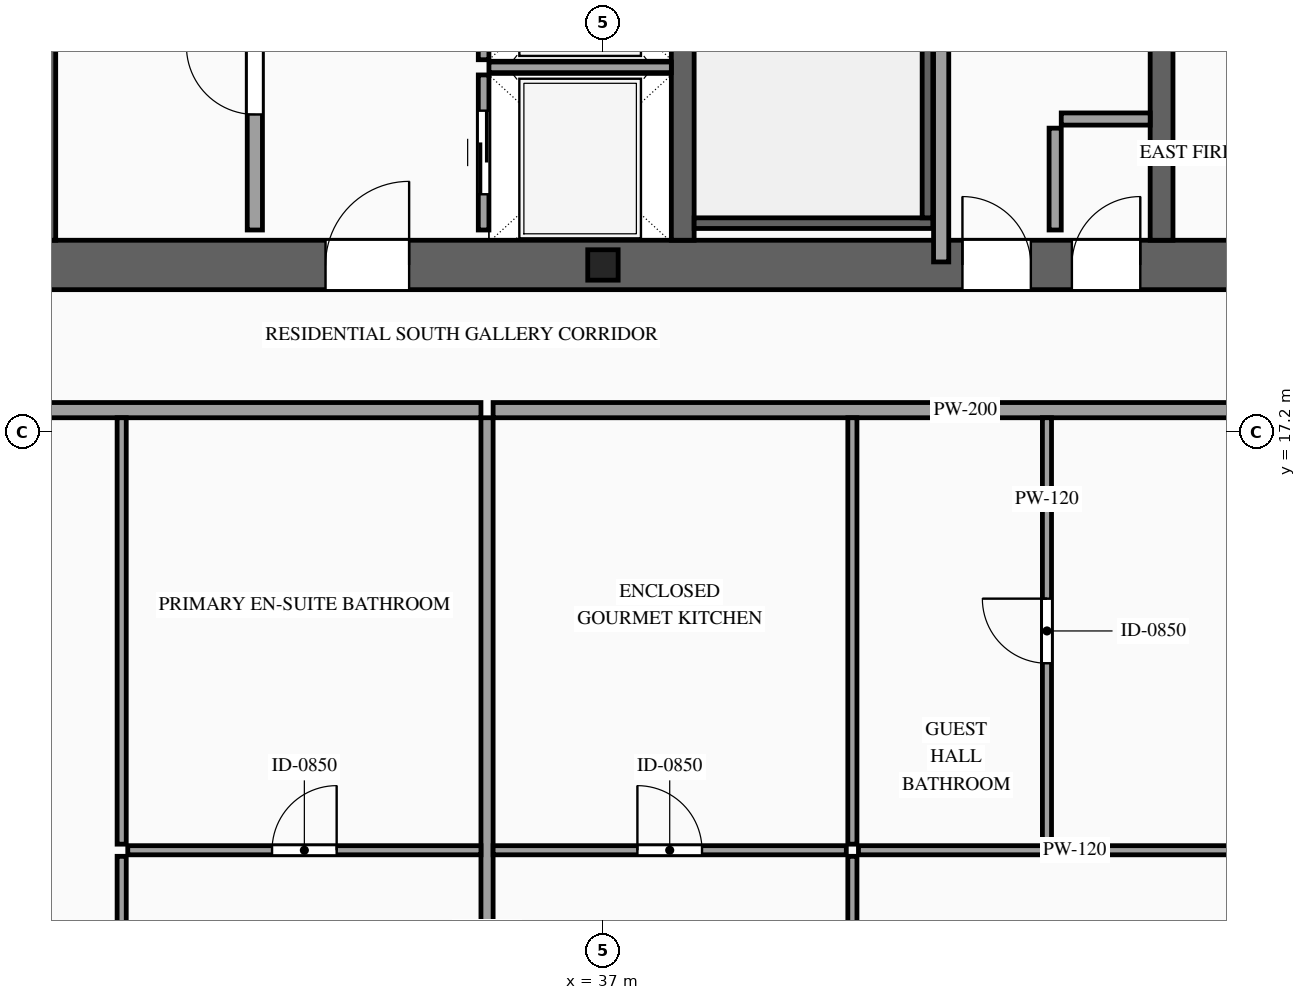
"""IFC4 building model, lengths in metres.
Left out: names, types, materials, properties, quantities, classifications, styles, units other than length and angle.
Written with IfcOpenShell. Run it as: python <this file> out.ifc"""

import sys

from ifc_helpers import new_model, si_unit, direction, frame, frame_2d, origin, origin_2d, place, context, subcontext, project, spatial, rectangle, i_section, extrude, source, transform, mapped, element, fill, save


model = new_model("IFC4")
c1 = context("Model", 3, precision=1e-05, world=origin(), true_north=direction((0.0, 1.0)))
c2 = subcontext(c1, "Body", "Model", "MODEL_VIEW")
j1 = project(units=[si_unit("LENGTHUNIT", "METRE"), si_unit("PLANEANGLEUNIT", "RADIAN")], contexts=[c1])
p1 = place(None, origin())
s1 = spatial("IfcSite", under=j1, at=p1, CompositionType="ELEMENT")
p2 = place(p1, origin())
s2 = spatial("IfcBuilding", under=s1, at=p2, CompositionType="ELEMENT")
p3 = place(p2, frame((0.0, 0.0, 216.0)))
s3 = spatial("IfcBuildingStorey", under=s2, at=p3, CompositionType="ELEMENT", Elevation=216.0)
p4 = place(p3, frame((23.475, 19.4, 0.0), z_axis=(0.0, 0.0, 1.0), x_axis=(1.0, 0.0, 0.0)))
e1 = element("IfcWall", 1, at=p4, inside=s3, PredefinedType="SHEAR", context=c2, shape_type="SweptSolid", body=[
    extrude(rectangle(XDim=27.05, YDim=0.65, at=frame_2d((13.525, 0.0))), origin(), (0.0, 0.0, 1.0), 3.5),
])
p5 = place(p4, frame((1.975, 0.0, 0.0)))
e2 = element("IfcOpeningElement", 2, at=p5, cuts=e1, PredefinedType="OPENING", context=c2, shape_type="SweptSolid", body=[
    extrude(rectangle(XDim=1.1, YDim=2.2, at=frame_2d((0.55, 1.1))), frame((0.0, 0.34, 0.0), z_axis=(0.0, -1.0, 0.0), x_axis=(1.0, 0.0, 0.0)), (0.0, 0.0, 1.0), 0.68),
])
p6 = place(p4, frame((9.875, 0.0, 0.0)))
e3 = element("IfcOpeningElement", 3, at=p6, cuts=e1, PredefinedType="OPENING", context=c2, shape_type="SweptSolid", body=[
    extrude(rectangle(XDim=1.1, YDim=2.2, at=frame_2d((0.55, 1.1))), frame((0.0, 0.34, 0.0), z_axis=(0.0, -1.0, 0.0), x_axis=(1.0, 0.0, 0.0)), (0.0, 0.0, 1.0), 0.68),
])
p7 = place(p4, frame((23.075, 0.0, 0.0)))
e4 = element("IfcOpeningElement", 4, at=p7, cuts=e1, PredefinedType="OPENING", context=c2, shape_type="SweptSolid", body=[
    extrude(rectangle(XDim=1.1, YDim=2.2, at=frame_2d((0.55, 1.1))), frame((0.0, 0.34, 0.0), z_axis=(0.0, -1.0, 0.0), x_axis=(1.0, 0.0, 0.0)), (0.0, 0.0, 1.0), 0.68),
])
p8 = place(p4, frame((19.695, 0.0, 0.0)))
e5 = element("IfcOpeningElement", 5, at=p8, cuts=e1, PredefinedType="OPENING", context=c2, shape_type="SweptSolid", body=[
    extrude(rectangle(XDim=0.9, YDim=2.15, at=frame_2d((0.45, 1.075))), frame((0.0, 0.34, 0.0), z_axis=(0.0, -1.0, 0.0), x_axis=(1.0, 0.0, 0.0)), (0.0, 0.0, 1.0), 0.68),
])
p9 = place(p4, frame((18.255, 0.0, 0.0)))
e6 = element("IfcOpeningElement", 6, at=p9, cuts=e1, PredefinedType="OPENING", context=c2, shape_type="SweptSolid", body=[
    extrude(rectangle(XDim=0.9, YDim=2.15, at=frame_2d((0.45, 1.075))), frame((0.0, 0.34, 0.0), z_axis=(0.0, -1.0, 0.0), x_axis=(1.0, 0.0, 0.0)), (0.0, 0.0, 1.0), 0.68),
])
m1 = source(origin(), c2, "Body", "SweptSolid", [
    extrude(rectangle(XDim=12.15, YDim=0.3, at=frame_2d((6.075, 0.0))), origin(), (0.0, 0.0, 1.0), 3.5),
])
for number, where, z_axis, x_axis in (
    (7, (29.65, 19.725, 0.0), (0.0, 0.0, 1.0), (0.0, 1.0, 0.0)),
    (8, (38.05, 19.725, 0.0), (0.0, 0.0, 1.0), (0.0, 1.0, 0.0)),
    (9, (44.35, 19.725, 0.0), (0.0, 0.0, 1.0), (0.0, 1.0, 0.0)),
):
    element("IfcWall", number, at=place(p3, frame(where, z_axis=z_axis, x_axis=x_axis)), inside=s3, PredefinedType="SOLIDWALL", context=c2, shape_type="MappedRepresentation", body=[
        mapped(m1, transform((0.0, 0.0, 0.0), scale=1.0)),
    ])
m2 = source(origin(), c2, "Body", "SweptSolid", [
    extrude(i_section(OverallWidth=0.4, OverallDepth=0.4, WebThickness=0.013, FlangeThickness=0.021, at=origin_2d()), origin(), (0.0, 0.0, 1.0), 3.5),
])
p10 = place(p3, frame((37.0, 19.4, 0.0), z_axis=(0.0, 0.0, 1.0), x_axis=(1.0, 0.0, 0.0)))
e10 = element("IfcColumn", 10, at=p10, inside=s3, PredefinedType="COLUMN", context=c2, shape_type="MappedRepresentation", body=[
    mapped(m2, transform((0.0, 0.0, 0.0), scale=1.0)),
])
p11 = place(p3, frame((35.43, 19.86, 0.0), z_axis=(0.0, 0.0, 1.0), x_axis=(0.0, 1.0, 0.0)))
e11 = element("IfcWall", 11, at=p11, inside=s3, PredefinedType="SOLIDWALL", context=c2, shape_type="SweptSolid", body=[
    extrude(rectangle(XDim=2.04, YDim=0.14, at=frame_2d((1.02, 0.0))), origin(), (0.0, 0.0, 1.0), 3.22),
])
p12 = place(p11, frame((0.47, 0.0, 0.0)))
e12 = element("IfcOpeningElement", 12, at=p12, cuts=e11, PredefinedType="OPENING", context=c2, shape_type="SweptSolid", body=[
    extrude(rectangle(XDim=1.1, YDim=2.2, at=frame_2d((0.55, 1.1))), frame((0.0, 0.085, 0.0), z_axis=(0.0, -1.0, 0.0), x_axis=(1.0, 0.0, 0.0)), (0.0, 0.0, 1.0), 0.17),
])
m3 = source(origin(), c2, "Body", "SweptSolid", [
    extrude(rectangle(XDim=2.4, YDim=0.14, at=frame_2d((1.2, 0.0))), origin(), (0.0, 0.0, 1.0), 3.22),
])
p13 = place(p3, frame((35.5, 22.0, 0.0), z_axis=(0.0, 0.0, 1.0), x_axis=(1.0, 0.0, 0.0)))
e13 = element("IfcWall", 13, at=p13, inside=s3, PredefinedType="SOLIDWALL", context=c2, shape_type="MappedRepresentation", body=[
    mapped(m3, transform((0.0, 0.0, 0.0), scale=1.0)),
])
p14 = place(p3, frame((35.43, 22.1, 0.0), z_axis=(0.0, 0.0, 1.0), x_axis=(0.0, 1.0, 0.0)))
e14 = element("IfcWall", 14, at=p14, inside=s3, PredefinedType="SOLIDWALL", context=c2, shape_type="SweptSolid", body=[
    extrude(rectangle(XDim=2.2, YDim=0.14, at=frame_2d((1.1, 0.0))), origin(), (0.0, 0.0, 1.0), 3.22),
])
p15 = place(p14, frame((0.55, 0.0, 0.0)))
e15 = element("IfcOpeningElement", 15, at=p15, cuts=e14, PredefinedType="OPENING", context=c2, shape_type="SweptSolid", body=[
    extrude(rectangle(XDim=1.1, YDim=2.2, at=frame_2d((0.55, 1.1))), frame((0.0, 0.085, 0.0), z_axis=(0.0, -1.0, 0.0), x_axis=(1.0, 0.0, 0.0)), (0.0, 0.0, 1.0), 0.17),
])
m4 = source(origin(), c2, "Body", "SweptSolid", [
    extrude(rectangle(XDim=3.14, YDim=0.14, at=frame_2d((1.57, 0.0))), origin(), (0.0, 0.0, 1.0), 3.22),
])
p16 = place(p3, frame((38.2, 19.95, 0.0), z_axis=(0.0, 0.0, 1.0), x_axis=(1.0, 0.0, 0.0)))
e16 = element("IfcWall", 16, at=p16, inside=s3, PredefinedType="SOLIDWALL", context=c2, shape_type="MappedRepresentation", body=[
    mapped(m4, transform((0.0, 0.0, 0.0), scale=1.0)),
])
m5 = source(origin(), c2, "Body", "SweptSolid", [
    extrude(rectangle(XDim=8.94, YDim=0.14, at=frame_2d((4.47, 0.0))), origin(), (0.0, 0.0, 1.0), 3.22),
])
p17 = place(p3, frame((41.27, 20.02, 0.0), z_axis=(0.0, 0.0, 1.0), x_axis=(0.0, 1.0, 0.0)))
e17 = element("IfcWall", 17, at=p17, inside=s3, PredefinedType="SOLIDWALL", context=c2, shape_type="MappedRepresentation", body=[
    mapped(m5, transform((0.0, 0.0, 0.0), scale=1.0)),
])
p18 = place(p3, frame((32.42, 19.86, 0.0), z_axis=(0.0, 0.0, 1.0), x_axis=(0.0, 1.0, 0.0)))
e18 = element("IfcWall", 18, at=p18, inside=s3, PredefinedType="PARTITIONING", context=c2, shape_type="SweptSolid", body=[
    extrude(rectangle(XDim=3.94, YDim=0.2, at=frame_2d((1.97, 0.0))), origin(), (0.0, 0.0, 1.0), 3.22),
])
p19 = place(p18, frame((1.52, 0.0, 0.0)))
e19 = element("IfcOpeningElement", 19, at=p19, cuts=e18, PredefinedType="OPENING", context=c2, shape_type="SweptSolid", body=[
    extrude(rectangle(XDim=0.9, YDim=2.15, at=frame_2d((0.45, 1.075))), frame((0.0, 0.115, 0.0), z_axis=(0.0, -1.0, 0.0), x_axis=(1.0, 0.0, 0.0)), (0.0, 0.0, 1.0), 0.23),
])
m6 = source(origin(), c2, "Body", "SweptSolid", [
    extrude(rectangle(XDim=1.34, YDim=0.16, at=frame_2d((0.67, 0.0))), origin(), (0.0, 0.0, 1.0), 3.22),
])
p20 = place(p3, frame((42.95, 19.86, 0.0), z_axis=(0.0, 0.0, 1.0), x_axis=(0.0, 1.0, 0.0)))
e20 = element("IfcWall", 20, at=p20, inside=s3, PredefinedType="PARTITIONING", context=c2, shape_type="MappedRepresentation", body=[
    mapped(m6, transform((0.0, 0.0, 0.0), scale=1.0)),
])
m7 = source(origin(), c2, "Body", "SweptSolid", [
    extrude(rectangle(XDim=1.17, YDim=0.16, at=frame_2d((0.585, 0.0))), origin(), (0.0, 0.0, 1.0), 3.22),
])
p21 = place(p3, frame((43.03, 21.32, 0.0), z_axis=(0.0, 0.0, 1.0), x_axis=(1.0, 0.0, 0.0)))
e21 = element("IfcWall", 21, at=p21, inside=s3, PredefinedType="PARTITIONING", context=c2, shape_type="MappedRepresentation", body=[
    mapped(m7, transform((0.0, 0.0, 0.0), scale=1.0)),
])
m8 = source(origin(), c2, "Body", "SweptSolid", [
    extrude(rectangle(XDim=6.51, YDim=0.2, at=frame_2d((3.255, 0.0))), origin(), (0.0, 0.0, 1.0), 3.22),
])
p22 = place(p3, frame((41.45, 19.44, 0.0), z_axis=(0.0, 0.0, 1.0), x_axis=(0.0, 1.0, 0.0)))
e22 = element("IfcWall", 22, at=p22, inside=s3, PredefinedType="PARTITIONING", context=c2, shape_type="MappedRepresentation", body=[
    mapped(m8, transform((0.0, 0.0, 0.0), scale=1.0)),
])
p23 = place(p3, frame((17.94, 17.49, 0.0), z_axis=(0.0, 0.0, 1.0), x_axis=(1.0, 0.0, 0.0)))
e23 = element("IfcWall", 23, at=p23, inside=s3, PredefinedType="PARTITIONING", context=c2, shape_type="SweptSolid", body=[
    extrude(rectangle(XDim=17.455, YDim=0.2, at=frame_2d((8.728, 0.0))), origin(), (0.0, 0.0, 1.0), 3.22),
])
p24 = place(p23, frame((10.033, 0.0, 0.0)))
e24 = element("IfcOpeningElement", 24, at=p24, cuts=e23, PredefinedType="OPENING", context=c2, shape_type="SweptSolid", body=[
    extrude(rectangle(XDim=1.0, YDim=2.2, at=frame_2d((0.5, 1.1))), frame((0.0, 0.115, 0.0), z_axis=(0.0, -1.0, 0.0), x_axis=(1.0, 0.0, 0.0)), (0.0, 0.0, 1.0), 0.23),
])
m9 = source(origin(), c2, "Body", "SweptSolid", [
    extrude(rectangle(XDim=13.54, YDim=0.16, at=frame_2d((6.77, 0.0))), origin(), (0.0, 0.0, 1.0), 3.22),
])
p25 = place(p3, frame((35.475, 3.85, 0.0), z_axis=(0.0, 0.0, 1.0), x_axis=(0.0, 1.0, 0.0)))
e25 = element("IfcWall", 25, at=p25, inside=s3, PredefinedType="PARTITIONING", context=c2, shape_type="MappedRepresentation", body=[
    mapped(m9, transform((0.0, 0.0, 0.0), scale=1.0)),
])
p26 = place(p3, frame((30.748, 11.7, 0.0), z_axis=(0.0, 0.0, 1.0), x_axis=(1.0, 0.0, 0.0)))
e26 = element("IfcWall", 26, at=p26, inside=s3, PredefinedType="PARTITIONING", context=c2, shape_type="SweptSolid", body=[
    extrude(rectangle(XDim=4.647, YDim=0.12, at=frame_2d((2.323, 0.0))), origin(), (0.0, 0.0, 1.0), 3.22),
])
p27 = place(p26, frame((1.898, 0.0, 0.0)))
e27 = element("IfcOpeningElement", 27, at=p27, cuts=e26, PredefinedType="OPENING", context=c2, shape_type="SweptSolid", body=[
    extrude(rectangle(XDim=0.85, YDim=2.1, at=frame_2d((0.425, 1.05))), frame((0.0, 0.075, 0.0), z_axis=(0.0, -1.0, 0.0), x_axis=(1.0, 0.0, 0.0)), (0.0, 0.0, 1.0), 0.15),
])
m10 = source(origin(), c2, "Body", "SweptSolid", [
    extrude(rectangle(XDim=5.61, YDim=0.12, at=frame_2d((2.805, 0.0))), origin(), (0.0, 0.0, 1.0), 3.22),
])
p28 = place(p3, frame((30.668, 11.78, 0.0), z_axis=(0.0, 0.0, 1.0), x_axis=(0.0, 1.0, 0.0)))
e28 = element("IfcWall", 28, at=p28, inside=s3, PredefinedType="PARTITIONING", context=c2, shape_type="MappedRepresentation", body=[
    mapped(m10, transform((0.0, 0.0, 0.0), scale=1.0)),
])
p29 = place(p3, frame((30.668, 3.85, 0.0), z_axis=(0.0, 0.0, 1.0), x_axis=(0.0, 1.0, 0.0)))
e29 = element("IfcWall", 29, at=p29, inside=s3, PredefinedType="PARTITIONING", context=c2, shape_type="SweptSolid", body=[
    extrude(rectangle(XDim=7.77, YDim=0.12, at=frame_2d((3.885, 0.0))), origin(), (0.0, 0.0, 1.0), 3.22),
])
p30 = place(p29, frame((3.435, 0.0, 0.0)))
e30 = element("IfcOpeningElement", 30, at=p30, cuts=e29, PredefinedType="OPENING", context=c2, shape_type="SweptSolid", body=[
    extrude(rectangle(XDim=0.9, YDim=2.15, at=frame_2d((0.45, 1.075))), frame((0.0, 0.075, 0.0), z_axis=(0.0, -1.0, 0.0), x_axis=(1.0, 0.0, 0.0)), (0.0, 0.0, 1.0), 0.15),
])
p31 = place(p3, frame((35.555, 17.49, 0.0), z_axis=(0.0, 0.0, 1.0), x_axis=(1.0, 0.0, 0.0)))
e31 = element("IfcWall", 31, at=p31, inside=s3, PredefinedType="PARTITIONING", context=c2, shape_type="SweptSolid", body=[
    extrude(rectangle(XDim=20.505, YDim=0.2, at=frame_2d((10.252, 0.0))), origin(), (0.0, 0.0, 1.0), 3.22),
])
p32 = place(p31, frame((12.678, 0.0, 0.0)))
e32 = element("IfcOpeningElement", 32, at=p32, cuts=e31, PredefinedType="OPENING", context=c2, shape_type="SweptSolid", body=[
    extrude(rectangle(XDim=1.0, YDim=2.2, at=frame_2d((0.5, 1.1))), frame((0.0, 0.115, 0.0), z_axis=(0.0, -1.0, 0.0), x_axis=(1.0, 0.0, 0.0)), (0.0, 0.0, 1.0), 0.23),
])
p33 = place(p3, frame((35.555, 11.7, 0.0), z_axis=(0.0, 0.0, 1.0), x_axis=(1.0, 0.0, 0.0)))
e33 = element("IfcWall", 33, at=p33, inside=s3, PredefinedType="PARTITIONING", context=c2, shape_type="SweptSolid", body=[
    extrude(rectangle(XDim=4.647, YDim=0.12, at=frame_2d((2.323, 0.0))), origin(), (0.0, 0.0, 1.0), 3.22),
])
p34 = place(p33, frame((1.898, 0.0, 0.0)))
e34 = element("IfcOpeningElement", 34, at=p34, cuts=e33, PredefinedType="OPENING", context=c2, shape_type="SweptSolid", body=[
    extrude(rectangle(XDim=0.85, YDim=2.1, at=frame_2d((0.425, 1.05))), frame((0.0, 0.075, 0.0), z_axis=(0.0, -1.0, 0.0), x_axis=(1.0, 0.0, 0.0)), (0.0, 0.0, 1.0), 0.15),
])
p35 = place(p3, frame((40.282, 11.78, 0.0), z_axis=(0.0, 0.0, 1.0), x_axis=(0.0, 1.0, 0.0)))
e35 = element("IfcWall", 35, at=p35, inside=s3, PredefinedType="PARTITIONING", context=c2, shape_type="MappedRepresentation", body=[
    mapped(m10, transform((0.0, 0.0, 0.0), scale=1.0)),
])
p36 = place(p3, frame((42.842, 11.78, 0.0), z_axis=(0.0, 0.0, 1.0), x_axis=(0.0, 1.0, 0.0)))
e36 = element("IfcWall", 36, at=p36, inside=s3, PredefinedType="PARTITIONING", context=c2, shape_type="SweptSolid", body=[
    extrude(rectangle(XDim=5.61, YDim=0.12, at=frame_2d((2.805, 0.0))), origin(), (0.0, 0.0, 1.0), 3.22),
])
p37 = place(p36, frame((2.38, 0.0, 0.0)))
e37 = element("IfcOpeningElement", 37, at=p37, cuts=e36, PredefinedType="OPENING", context=c2, shape_type="SweptSolid", body=[
    extrude(rectangle(XDim=0.85, YDim=2.1, at=frame_2d((0.425, 1.05))), frame((0.0, 0.075, 0.0), z_axis=(0.0, -1.0, 0.0), x_axis=(1.0, 0.0, 0.0)), (0.0, 0.0, 1.0), 0.15),
])
p38 = place(p3, frame((40.282, 3.85, 0.0), z_axis=(0.0, 0.0, 1.0), x_axis=(0.0, 1.0, 0.0)))
e38 = element("IfcWall", 38, at=p38, inside=s3, PredefinedType="PARTITIONING", context=c2, shape_type="SweptSolid", body=[
    extrude(rectangle(XDim=7.77, YDim=0.12, at=frame_2d((3.885, 0.0))), origin(), (0.0, 0.0, 1.0), 3.22),
])
p39 = place(p38, frame((3.435, 0.0, 0.0)))
e39 = element("IfcOpeningElement", 39, at=p39, cuts=e38, PredefinedType="OPENING", context=c2, shape_type="SweptSolid", body=[
    extrude(rectangle(XDim=0.9, YDim=2.15, at=frame_2d((0.45, 1.075))), frame((0.0, 0.075, 0.0), z_axis=(0.0, -1.0, 0.0), x_axis=(1.0, 0.0, 0.0)), (0.0, 0.0, 1.0), 0.15),
])
m11 = source(origin(), c2, "Body", "SweptSolid", [
    extrude(rectangle(XDim=5.691, YDim=0.12, at=frame_2d((2.845, 0.0))), origin(), (0.0, 0.0, 1.0), 3.22),
])
p40 = place(p3, frame((40.362, 11.7, 0.0), z_axis=(0.0, 0.0, 1.0), x_axis=(1.0, 0.0, 0.0)))
e40 = element("IfcWall", 40, at=p40, inside=s3, PredefinedType="PARTITIONING", context=c2, shape_type="MappedRepresentation", body=[
    mapped(m11, transform((0.0, 0.0, 0.0), scale=1.0)),
])
m12 = source(origin(), c2, "Body", "SweptSolid", [
    extrude(rectangle(XDim=1.1, YDim=2.2, at=frame_2d((0.55, 1.1))), frame((0.0, 0.025, 0.0), z_axis=(0.0, -1.0, 0.0), x_axis=(1.0, 0.0, 0.0)), (0.0, 0.0, 1.0), 0.05),
])
p41 = place(p12, origin())
e41 = element("IfcDoor", 41, at=p41, inside=s3, OperationType="SLIDING_TO_RIGHT", PredefinedType="DOOR", context=c2, shape_type="MappedRepresentation", body=[
    mapped(m12, transform((0.0, 0.0, 0.0), scale=1.0)),
])
fill(e12, e41)
m13 = source(origin(), c2, "Body", "SweptSolid", [
    extrude(rectangle(XDim=1.1, YDim=2.2, at=frame_2d((0.55, 1.1))), frame((0.0, 0.025, 0.0), z_axis=(0.0, -1.0, 0.0), x_axis=(1.0, 0.0, 0.0)), (0.0, 0.0, 1.0), 0.05),
])
p42 = place(p6, origin())
e42 = element("IfcDoor", 42, at=p42, inside=s3, OperationType="SINGLE_SWING_RIGHT", PredefinedType="DOOR", context=c2, shape_type="MappedRepresentation", body=[
    mapped(m13, transform((0.0, 0.0, 0.0), scale=1.0)),
])
fill(e3, e42)
m14 = source(origin(), c2, "Body", "SweptSolid", [
    extrude(rectangle(XDim=0.9, YDim=2.15, at=frame_2d((0.45, 1.075))), frame((0.0, 0.025, 0.0), z_axis=(0.0, -1.0, 0.0), x_axis=(1.0, 0.0, 0.0)), (0.0, 0.0, 1.0), 0.05),
])
p43 = place(p19, origin())
e43 = element("IfcDoor", 43, at=p43, inside=s3, OperationType="SINGLE_SWING_RIGHT", PredefinedType="DOOR", context=c2, shape_type="MappedRepresentation", body=[
    mapped(m14, transform((0.0, 0.0, 0.0), scale=1.0)),
])
fill(e19, e43)
p44 = place(p8, origin())
e44 = element("IfcDoor", 44, at=p44, inside=s3, OperationType="SINGLE_SWING_RIGHT", PredefinedType="DOOR", context=c2, shape_type="MappedRepresentation", body=[
    mapped(m14, transform((0.0, 0.0, 0.0), scale=1.0)),
])
fill(e5, e44)
p45 = place(p9, origin())
e45 = element("IfcDoor", 45, at=p45, inside=s3, OperationType="SINGLE_SWING_LEFT", PredefinedType="DOOR", context=c2, shape_type="MappedRepresentation", body=[
    mapped(m14, transform((0.0, 0.0, 0.0), scale=1.0)),
])
fill(e6, e45)
m15 = source(origin(), c2, "Body", "SweptSolid", [
    extrude(rectangle(XDim=0.85, YDim=2.1, at=frame_2d((0.425, 1.05))), frame((0.0, 0.025, 0.0), z_axis=(0.0, -1.0, 0.0), x_axis=(1.0, 0.0, 0.0)), (0.0, 0.0, 1.0), 0.05),
])
p46 = place(p27, origin())
e46 = element("IfcDoor", 46, at=p46, inside=s3, OperationType="SINGLE_SWING_RIGHT", PredefinedType="DOOR", context=c2, shape_type="MappedRepresentation", body=[
    mapped(m15, transform((0.0, 0.0, 0.0), scale=1.0)),
])
fill(e27, e46)
p47 = place(p34, origin())
e47 = element("IfcDoor", 47, at=p47, inside=s3, OperationType="SINGLE_SWING_LEFT", PredefinedType="DOOR", context=c2, shape_type="MappedRepresentation", body=[
    mapped(m15, transform((0.0, 0.0, 0.0), scale=1.0)),
])
fill(e34, e47)
p48 = place(p37, origin())
e48 = element("IfcDoor", 48, at=p48, inside=s3, OperationType="SINGLE_SWING_RIGHT", PredefinedType="DOOR", context=c2, shape_type="MappedRepresentation", body=[
    mapped(m15, transform((0.0, 0.0, 0.0), scale=1.0)),
])
fill(e37, e48)
save(model, sys.argv[1])
